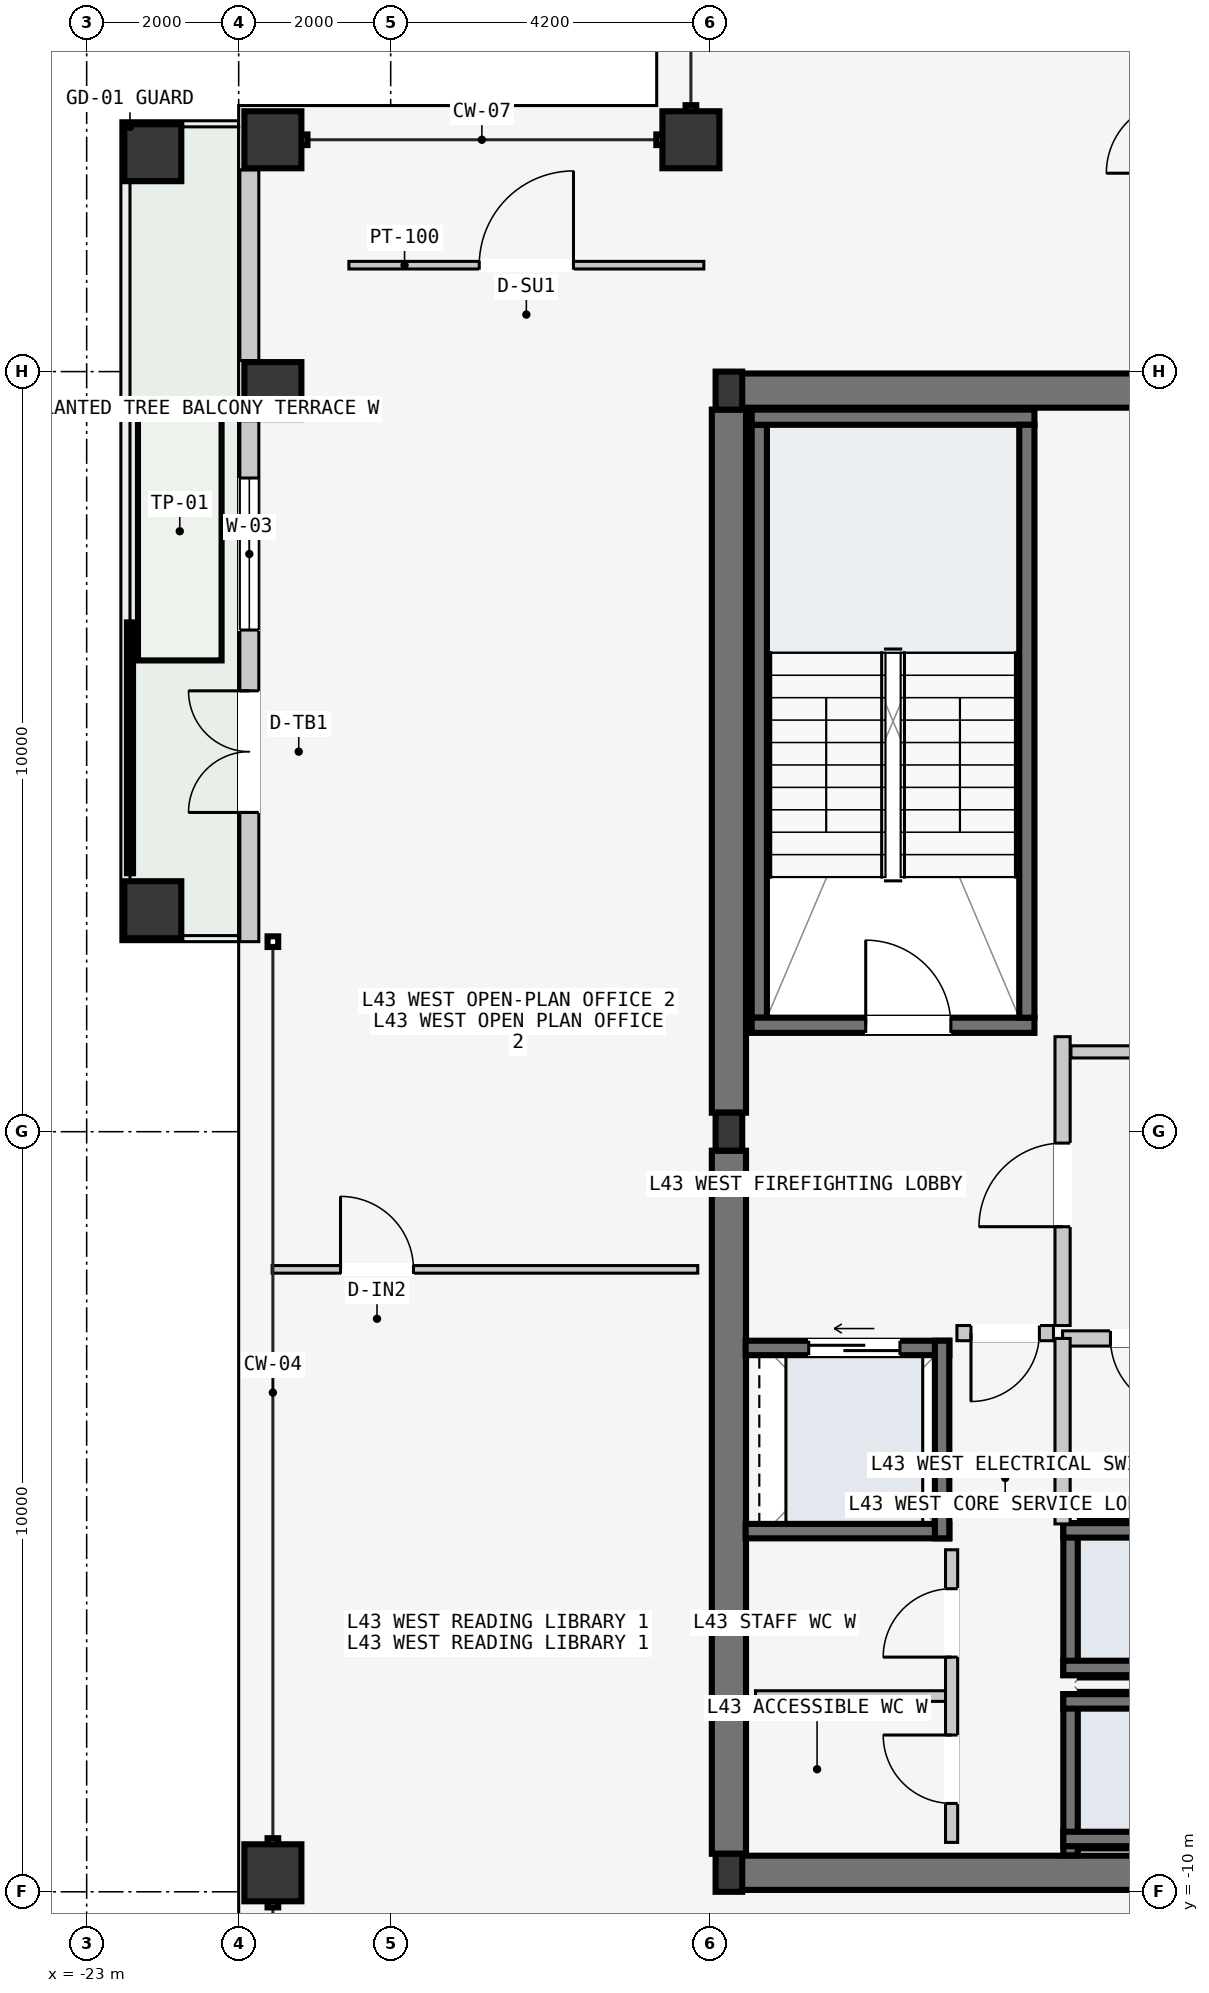
"""IFC4 building model, lengths in metres.
Left out: names, types, materials, properties, quantities, classifications, styles, units other than length and angle.
Written with IfcOpenShell. Run it as: python <this file> out.ifc"""

import sys

from ifc_helpers import new_model, si_unit, direction, frame, frame_2d, origin, origin_2d, place, context, subcontext, project, spatial, rectangle, hollow_rectangle, i_section, extrude, element, fill, save


model = new_model("IFC4")
c1 = context("Model", 3, precision=1e-05, world=origin(), true_north=direction((0.0, 1.0)))
c2 = subcontext(c1, "Body", "Model", "MODEL_VIEW")
j1 = project(units=[si_unit("LENGTHUNIT", "METRE"), si_unit("PLANEANGLEUNIT", "RADIAN")], contexts=[c1])
p1 = place(None, origin())
s1 = spatial("IfcSite", under=j1, at=p1, CompositionType="ELEMENT")
p2 = place(p1, origin())
s2 = spatial("IfcBuilding", under=s1, at=p2, CompositionType="ELEMENT")
p3 = place(p2, frame((0.0, 0.0, 165.9)))
s3 = spatial("IfcBuildingStorey", under=s2, at=p3, CompositionType="ELEMENT", Elevation=165.9)
for number, where, z_axis, x_axis in (
    (1, (-14.53, -9.75, -0.2), (0.0, 0.0, 1.0), (1.0, 0.0, 0.0)),
    (2, (-14.53, 9.75, -0.2), (0.0, 0.0, 1.0), (1.0, 0.0, 0.0)),
):
    element("IfcWall", number, at=place(p3, frame(where, z_axis=z_axis, x_axis=x_axis)), inside=s3, PredefinedType="SHEAR", context=c2, shape_type="SweptSolid", body=[
        extrude(rectangle(XDim=6.46, YDim=0.45, at=frame_2d((3.23, 0.0))), origin(), (0.0, 0.0, 1.0), 3.6),
    ])
for number, where, z_axis, x_axis in (
    (3, (-14.55, -9.5, -0.2), (0.0, 0.0, 1.0), (0.0, 1.0, 0.0)),
    (4, (-14.55, 0.25, -0.2), (0.0, 0.0, 1.0), (0.0, 1.0, 0.0)),
):
    element("IfcWall", number, at=place(p3, frame(where, z_axis=z_axis, x_axis=x_axis)), inside=s3, PredefinedType="SHEAR", context=c2, shape_type="SweptSolid", body=[
        extrude(rectangle(XDim=9.25, YDim=0.45, at=frame_2d((4.625, 0.0))), origin(), (0.0, 0.0, 1.0), 3.6),
    ])
p4 = place(p3, frame((-14.15, 1.5, -0.2), z_axis=(0.0, 0.0, 1.0), x_axis=(0.0, 1.0, 0.0)))
e5 = element("IfcWall", 5, at=p4, inside=s3, PredefinedType="SOLIDWALL", context=c2, shape_type="SweptSolid", body=[
    extrude(rectangle(XDim=7.8, YDim=0.2, at=frame_2d((3.9, 0.0))), origin(), (0.0, 0.0, 1.0), 3.6),
])
p5 = place(p3, frame((-14.25, 1.4, -0.2), z_axis=(0.0, 0.0, 1.0), x_axis=(1.0, 0.0, 0.0)))
e6 = element("IfcWall", 6, at=p5, inside=s3, PredefinedType="SOLIDWALL", context=c2, shape_type="SweptSolid", body=[
    extrude(rectangle(XDim=3.72, YDim=0.2, at=frame_2d((1.86, 0.0))), origin(), (0.0, 0.0, 1.0), 3.6),
])
p6 = place(p5, frame((1.5, 0.0, 0.2)))
e7 = element("IfcOpeningElement", 7, at=p6, cuts=e6, PredefinedType="OPENING", context=c2, shape_type="SweptSolid", body=[
    extrude(rectangle(XDim=1.12, YDim=2.18, at=frame_2d((0.56, 1.09))), frame((0.0, 0.11, 0.0), z_axis=(0.0, -1.0, 0.0), x_axis=(1.0, 0.0, 0.0)), (0.0, 0.0, 1.0), 0.22),
])
p7 = place(p3, frame((-14.25, 9.4, -0.2), z_axis=(0.0, 0.0, 1.0), x_axis=(1.0, 0.0, 0.0)))
e8 = element("IfcWall", 8, at=p7, inside=s3, PredefinedType="SOLIDWALL", context=c2, shape_type="SweptSolid", body=[
    extrude(rectangle(XDim=3.72, YDim=0.2, at=frame_2d((1.86, 0.0))), origin(), (0.0, 0.0, 1.0), 3.6),
])
p8 = place(p3, frame((-10.63, 1.5, -0.2), z_axis=(0.0, 0.0, 1.0), x_axis=(0.0, 1.0, 0.0)))
e9 = element("IfcWall", 9, at=p8, inside=s3, PredefinedType="SOLIDWALL", context=c2, shape_type="SweptSolid", body=[
    extrude(rectangle(XDim=7.8, YDim=0.2, at=frame_2d((3.9, 0.0))), origin(), (0.0, 0.0, 1.0), 3.6),
])
for number, where, z_axis, x_axis in (
    (10, (-14.55, -9.75, 0.0), (0.0, 0.0, 1.0), (1.0, 0.0, 0.0)),
    (11, (-14.55, 0.0, 0.0), (0.0, 0.0, 1.0), (1.0, 0.0, 0.0)),
    (12, (-14.55, 9.75, 0.0), (0.0, 0.0, 1.0), (1.0, 0.0, 0.0)),
):
    element("IfcColumn", number, at=place(p3, frame(where, z_axis=z_axis, x_axis=x_axis)), inside=s3, PredefinedType="COLUMN", context=c2, shape_type="SweptSolid", body=[
        extrude(i_section(OverallWidth=0.35, OverallDepth=0.5, WebThickness=0.02, FlangeThickness=0.032, at=origin_2d()), origin(), (0.0, 0.0, 1.0), 3.6),
    ])
for number, where, z_axis, x_axis in (
    (13, (-20.55, -9.75, 0.0), (0.0, 0.0, 1.0), (0.0, 1.0, 0.0)),
    (14, (-20.55, 9.75, 0.0), (0.0, 0.0, 1.0), (0.0, 1.0, 0.0)),
    (15, (-20.55, 13.05, 0.0), (0.0, 0.0, 1.0), (0.0, 1.0, 0.0)),
    (16, (-15.05, 13.05, 0.0), (0.0, 0.0, 1.0), (1.0, 0.0, 0.0)),
    (17, (-22.13, 2.92, 0.0), (0.0, 0.0, 1.0), (0.0, 1.0, 0.0)),
    (18, (-22.13, 12.88, 0.0), (0.0, 0.0, 1.0), (0.0, 1.0, 0.0)),
):
    element("IfcColumn", number, at=place(p3, frame(where, z_axis=z_axis, x_axis=x_axis)), inside=s3, PredefinedType="COLUMN", context=c2, shape_type="SweptSolid", body=[
        extrude(hollow_rectangle(XDim=0.75, YDim=0.75, WallThickness=0.032, at=origin_2d()), origin(), (0.0, 0.0, 1.0), 3.6),
    ])
p9 = place(p3, frame((-20.86, 2.5, 0.0), z_axis=(0.0, 0.0, 1.0), x_axis=(0.0, 1.0, 0.0)))
e19 = element("IfcWall", 19, at=p9, inside=s3, PredefinedType="STANDARD", context=c2, shape_type="SweptSolid", body=[
    extrude(rectangle(XDim=6.855, YDim=0.25, at=frame_2d((3.427, 0.0))), origin(), (0.0, 0.0, 1.0), 3.4),
])
p10 = place(p9, frame((1.7, 0.0, 0.0)))
e20 = element("IfcOpeningElement", 20, at=p10, cuts=e19, PredefinedType="OPENING", context=c2, shape_type="SweptSolid", body=[
    extrude(rectangle(XDim=1.6, YDim=2.2, at=frame_2d((0.8, 1.1))), frame((0.0, 0.135, 0.0), z_axis=(0.0, -1.0, 0.0), x_axis=(1.0, 0.0, 0.0)), (0.0, 0.0, 1.0), 0.27),
])
p11 = place(p9, frame((4.1, 0.0, 0.85)))
e21 = element("IfcOpeningElement", 21, at=p11, cuts=e19, PredefinedType="OPENING", context=c2, shape_type="SweptSolid", body=[
    extrude(rectangle(XDim=2.0, YDim=2.1, at=frame_2d((1.0, 1.05))), frame((0.0, 0.135, 0.0), z_axis=(0.0, -1.0, 0.0), x_axis=(1.0, 0.0, 0.0)), (0.0, 0.0, 1.0), 0.27),
])
p12 = place(p3, frame((-20.86, 10.145, 0.0), z_axis=(0.0, 0.0, 1.0), x_axis=(0.0, 1.0, 0.0)))
e22 = element("IfcWall", 22, at=p12, inside=s3, PredefinedType="STANDARD", context=c2, shape_type="SweptSolid", body=[
    extrude(rectangle(XDim=2.51, YDim=0.25, at=frame_2d((1.255, 0.0))), origin(), (0.0, 0.0, 1.0), 3.4),
])
p13 = place(p3, frame((-10.055, -9.52, -0.2), z_axis=(0.0, 0.0, 1.0), x_axis=(0.0, 1.0, 0.0)))
e23 = element("IfcWall", 23, at=p13, inside=s3, PredefinedType="SOLIDWALL", context=c2, shape_type="SweptSolid", body=[
    extrude(rectangle(XDim=2.12, YDim=0.19, at=frame_2d((1.06, 0.0))), origin(), (0.0, 0.0, 1.0), 3.6),
])
for number, where, z_axis, x_axis in (
    (24, (-10.15, -7.495, -0.2), (0.0, 0.0, 1.0), (1.0, 0.0, 0.0)),
    (25, (-10.15, -9.305, -0.2), (0.0, 0.0, 1.0), (1.0, 0.0, 0.0)),
):
    element("IfcWall", number, at=place(p3, frame(where, z_axis=z_axis, x_axis=x_axis)), inside=s3, PredefinedType="SOLIDWALL", context=c2, shape_type="SweptSolid", body=[
        extrude(rectangle(XDim=2.2, YDim=0.19, at=frame_2d((1.1, 0.0))), origin(), (0.0, 0.0, 1.0), 3.6),
    ])
p14 = place(p3, frame((-10.055, -7.15, -0.2), z_axis=(0.0, 0.0, 1.0), x_axis=(0.0, 1.0, 0.0)))
e26 = element("IfcWall", 26, at=p14, inside=s3, PredefinedType="SOLIDWALL", context=c2, shape_type="SweptSolid", body=[
    extrude(rectangle(XDim=2.0, YDim=0.19, at=frame_2d((1.0, 0.0))), origin(), (0.0, 0.0, 1.0), 3.6),
])
for number, where, z_axis, x_axis in (
    (27, (-10.15, -5.245, -0.2), (0.0, 0.0, 1.0), (1.0, 0.0, 0.0)),
    (28, (-10.15, -7.055, -0.2), (0.0, 0.0, 1.0), (1.0, 0.0, 0.0)),
):
    element("IfcWall", number, at=place(p3, frame(where, z_axis=z_axis, x_axis=x_axis)), inside=s3, PredefinedType="SOLIDWALL", context=c2, shape_type="SweptSolid", body=[
        extrude(rectangle(XDim=2.2, YDim=0.19, at=frame_2d((1.1, 0.0))), origin(), (0.0, 0.0, 1.0), 3.6),
    ])
p15 = place(p3, frame((-14.33, -2.845, -0.2), z_axis=(0.0, 0.0, 1.0), x_axis=(1.0, 0.0, 0.0)))
e29 = element("IfcWall", 29, at=p15, inside=s3, PredefinedType="SOLIDWALL", context=c2, shape_type="SweptSolid", body=[
    extrude(rectangle(XDim=2.68, YDim=0.19, at=frame_2d((1.34, 0.0))), origin(), (0.0, 0.0, 1.0), 3.6),
])
p16 = place(p15, frame((0.83, 0.0, 0.2)))
e30 = element("IfcOpeningElement", 30, at=p16, cuts=e29, PredefinedType="OPENING", context=c2, shape_type="SweptSolid", body=[
    extrude(rectangle(XDim=1.2, YDim=2.2, at=frame_2d((0.6, 1.1))), frame((0.0, 0.105, 0.0), z_axis=(0.0, -1.0, 0.0), x_axis=(1.0, 0.0, 0.0)), (0.0, 0.0, 1.0), 0.21),
])
p17 = place(p3, frame((-14.33, -5.255, -0.2), z_axis=(0.0, 0.0, 1.0), x_axis=(1.0, 0.0, 0.0)))
e31 = element("IfcWall", 31, at=p17, inside=s3, PredefinedType="SOLIDWALL", context=c2, shape_type="SweptSolid", body=[
    extrude(rectangle(XDim=2.68, YDim=0.19, at=frame_2d((1.34, 0.0))), origin(), (0.0, 0.0, 1.0), 3.6),
])
p18 = place(p3, frame((-11.745, -5.35, -0.2), z_axis=(0.0, 0.0, 1.0), x_axis=(0.0, 1.0, 0.0)))
e32 = element("IfcWall", 32, at=p18, inside=s3, PredefinedType="SOLIDWALL", context=c2, shape_type="SweptSolid", body=[
    extrude(rectangle(XDim=2.6, YDim=0.19, at=frame_2d((1.3, 0.0))), origin(), (0.0, 0.0, 1.0), 3.6),
])
p19 = place(p3, frame((-10.16, -2.55, 0.0), z_axis=(0.0, 0.0, 1.0), x_axis=(0.0, 1.0, 0.0)))
e33 = element("IfcWall", 33, at=p19, inside=s3, PredefinedType="PARTITIONING", context=c2, shape_type="SweptSolid", body=[
    extrude(rectangle(XDim=3.8, YDim=0.2, at=frame_2d((1.9, 0.0))), origin(), (0.0, 0.0, 1.0), 3.4),
])
p20 = place(p19, frame((1.3, 0.0, 0.0)))
e34 = element("IfcOpeningElement", 34, at=p20, cuts=e33, PredefinedType="OPENING", context=c2, shape_type="SweptSolid", body=[
    extrude(rectangle(XDim=1.1, YDim=2.15, at=frame_2d((0.55, 1.075))), frame((0.0, 0.11, 0.0), z_axis=(0.0, -1.0, 0.0), x_axis=(1.0, 0.0, 0.0)), (0.0, 0.0, 1.0), 0.22),
])
p21 = place(p3, frame((-10.28, -2.65, 0.0), z_axis=(0.0, 0.0, 1.0), x_axis=(-1.0, 0.0, 0.0)))
e35 = element("IfcWall", 35, at=p21, inside=s3, PredefinedType="PARTITIONING", context=c2, shape_type="SweptSolid", body=[
    extrude(rectangle(XDim=1.27, YDim=0.2, at=frame_2d((0.635, 0.0))), origin(), (0.0, 0.0, 1.0), 3.4),
])
p22 = place(p21, frame((0.185, 0.0, 0.0)))
e36 = element("IfcOpeningElement", 36, at=p22, cuts=e35, PredefinedType="OPENING", context=c2, shape_type="SweptSolid", body=[
    extrude(rectangle(XDim=0.9, YDim=2.15, at=frame_2d((0.45, 1.075))), frame((0.0, 0.11, 0.0), z_axis=(0.0, -1.0, 0.0), x_axis=(1.0, 0.0, 0.0)), (0.0, 0.0, 1.0), 0.22),
])
p23 = place(p3, frame((-7.96, -2.72, 0.0), z_axis=(0.0, 0.0, 1.0), x_axis=(-1.0, 0.0, 0.0)))
e37 = element("IfcWall", 37, at=p23, inside=s3, PredefinedType="PARTITIONING", context=c2, shape_type="SweptSolid", body=[
    extrude(rectangle(XDim=2.2, YDim=0.2, at=frame_2d((1.1, 0.0))), origin(), (0.0, 0.0, 1.0), 3.4),
])
p24 = place(p23, frame((0.62, 0.0, 0.0)))
e38 = element("IfcOpeningElement", 38, at=p24, cuts=e37, PredefinedType="OPENING", context=c2, shape_type="SweptSolid", body=[
    extrude(rectangle(XDim=0.95, YDim=2.1, at=frame_2d((0.475, 1.05))), frame((0.0, 0.11, 0.0), z_axis=(0.0, -1.0, 0.0), x_axis=(1.0, 0.0, 0.0)), (0.0, 0.0, 1.0), 0.22),
])
p25 = place(p3, frame((-10.16, -5.16, 0.0), z_axis=(0.0, 0.0, 1.0), x_axis=(0.0, 1.0, 0.0)))
e39 = element("IfcWall", 39, at=p25, inside=s3, PredefinedType="PARTITIONING", context=c2, shape_type="SweptSolid", body=[
    extrude(rectangle(XDim=2.44, YDim=0.2, at=frame_2d((1.22, 0.0))), origin(), (0.0, 0.0, 1.0), 3.4),
])
p26 = place(p3, frame((-11.7, -7.425, 0.0), z_axis=(0.0, 0.0, 1.0), x_axis=(-1.0, 0.0, 0.0)))
e40 = element("IfcWall", 40, at=p26, inside=s3, PredefinedType="PARTITIONING", context=c2, shape_type="SweptSolid", body=[
    extrude(rectangle(XDim=2.5, YDim=0.14, at=frame_2d((1.25, 0.0))), origin(), (0.0, 0.0, 1.0), 3.4),
])
p27 = place(p3, frame((-11.62, -9.35, 0.0), z_axis=(0.0, 0.0, 1.0), x_axis=(0.0, 1.0, 0.0)))
e41 = element("IfcWall", 41, at=p27, inside=s3, PredefinedType="PARTITIONING", context=c2, shape_type="SweptSolid", body=[
    extrude(rectangle(XDim=3.85, YDim=0.16, at=frame_2d((1.925, 0.0))), origin(), (0.0, 0.0, 1.0), 3.4),
])
p28 = place(p27, frame((0.512, 0.0, 0.0)))
e42 = element("IfcOpeningElement", 42, at=p28, cuts=e41, PredefinedType="OPENING", context=c2, shape_type="SweptSolid", body=[
    extrude(rectangle(XDim=0.9, YDim=2.15, at=frame_2d((0.45, 1.075))), frame((0.0, 0.09, 0.0), z_axis=(0.0, -1.0, 0.0), x_axis=(1.0, 0.0, 0.0)), (0.0, 0.0, 1.0), 0.18),
])
p29 = place(p27, frame((2.438, 0.0, 0.0)))
e43 = element("IfcOpeningElement", 43, at=p29, cuts=e41, PredefinedType="OPENING", context=c2, shape_type="SweptSolid", body=[
    extrude(rectangle(XDim=0.9, YDim=2.15, at=frame_2d((0.45, 1.075))), frame((0.0, 0.09, 0.0), z_axis=(0.0, -1.0, 0.0), x_axis=(1.0, 0.0, 0.0)), (0.0, 0.0, 1.0), 0.18),
])
p30 = place(p3, frame((-10.05, 1.05, 0.0), z_axis=(0.0, 0.0, 1.0), x_axis=(1.0, 0.0, 0.0)))
e44 = element("IfcWall", 44, at=p30, inside=s3, PredefinedType="PARTITIONING", context=c2, shape_type="SweptSolid", body=[
    extrude(rectangle(XDim=8.79, YDim=0.16, at=frame_2d((4.395, 0.0))), origin(), (0.0, 0.0, 1.0), 3.4),
])
p31 = place(p3, frame((-19.55, 11.4, 0.0), z_axis=(0.0, 0.0, 1.0), x_axis=(1.0, 0.0, 0.0)))
e45 = element("IfcWall", 45, at=p31, inside=s3, PredefinedType="PARTITIONING", context=c2, shape_type="SweptSolid", body=[
    extrude(rectangle(XDim=4.67, YDim=0.1, at=frame_2d((2.335, 0.0))), origin(), (0.0, 0.0, 1.0), 3.4),
])
p32 = place(p31, frame((1.715, 0.0, 0.0)))
e46 = element("IfcOpeningElement", 46, at=p32, cuts=e45, PredefinedType="OPENING", context=c2, shape_type="SweptSolid", body=[
    extrude(rectangle(XDim=1.24, YDim=2.24, at=frame_2d((0.62, 1.12))), frame((0.0, 0.06, 0.0), z_axis=(0.0, -1.0, 0.0), x_axis=(1.0, 0.0, 0.0)), (0.0, 0.0, 1.0), 0.12),
])
p33 = place(p3, frame((-20.56, -1.811, 0.0), z_axis=(0.0, 0.0, 1.0), x_axis=(1.0, 0.0, 0.0)))
e47 = element("IfcWall", 47, at=p33, inside=s3, PredefinedType="PARTITIONING", context=c2, shape_type="SweptSolid", body=[
    extrude(rectangle(XDim=5.6, YDim=0.1, at=frame_2d((2.8, 0.0))), origin(), (0.0, 0.0, 1.0), 3.4),
])
p34 = place(p33, frame((0.9, 0.0, 0.0)))
e48 = element("IfcOpeningElement", 48, at=p34, cuts=e47, PredefinedType="OPENING", context=c2, shape_type="SweptSolid", body=[
    extrude(rectangle(XDim=0.96, YDim=2.18, at=frame_2d((0.48, 1.09))), frame((0.0, 0.06, 0.0), z_axis=(0.0, -1.0, 0.0), x_axis=(1.0, 0.0, 0.0)), (0.0, 0.0, 1.0), 0.12),
])
p35 = place(p6, origin())
e49 = element("IfcDoor", 49, at=p35, inside=s3, OperationType="SINGLE_SWING_LEFT", PredefinedType="DOOR", context=c2, shape_type="SweptSolid", body=[
    extrude(rectangle(XDim=1.12, YDim=2.18, at=frame_2d((0.56, 1.09))), frame((0.0, 0.025, 0.0), z_axis=(0.0, -1.0, 0.0), x_axis=(1.0, 0.0, 0.0)), (0.0, 0.0, 1.0), 0.05),
])
fill(e7, e49)
p36 = place(p10, origin())
e50 = element("IfcDoor", 50, at=p36, inside=s3, OperationType="DOUBLE_DOOR_SINGLE_SWING", PredefinedType="DOOR", context=c2, shape_type="SweptSolid", body=[
    extrude(rectangle(XDim=1.6, YDim=2.2, at=frame_2d((0.8, 1.1))), frame((0.0, 0.025, 0.0), z_axis=(0.0, -1.0, 0.0), x_axis=(1.0, 0.0, 0.0)), (0.0, 0.0, 1.0), 0.05),
])
fill(e20, e50)
p37 = place(p11, origin())
e51 = element("IfcWindow", 51, at=p37, inside=s3, PartitioningType="SINGLE_PANEL", PredefinedType="WINDOW", context=c2, shape_type="SweptSolid", body=[
    extrude(rectangle(XDim=2.0, YDim=2.1, at=frame_2d((1.0, 1.05))), frame((0.0, 0.03, 0.0), z_axis=(0.0, -1.0, 0.0), x_axis=(1.0, 0.0, 0.0)), (0.0, 0.0, 1.0), 0.06),
])
fill(e21, e51)
p38 = place(p16, origin())
e52 = element("IfcDoor", 52, at=p38, inside=s3, OperationType="SLIDING_TO_LEFT", PredefinedType="DOOR", context=c2, shape_type="SweptSolid", body=[
    extrude(rectangle(XDim=1.2, YDim=2.2, at=frame_2d((0.6, 1.1))), frame((0.0, 0.025, 0.0), z_axis=(0.0, -1.0, 0.0), x_axis=(1.0, 0.0, 0.0)), (0.0, 0.0, 1.0), 0.05),
])
fill(e30, e52)
p39 = place(p20, origin())
e53 = element("IfcDoor", 53, at=p39, inside=s3, OperationType="SINGLE_SWING_LEFT", PredefinedType="DOOR", context=c2, shape_type="SweptSolid", body=[
    extrude(rectangle(XDim=1.1, YDim=2.15, at=frame_2d((0.55, 1.075))), frame((0.0, 0.025, 0.0), z_axis=(0.0, -1.0, 0.0), x_axis=(1.0, 0.0, 0.0)), (0.0, 0.0, 1.0), 0.05),
])
fill(e34, e53)
p40 = place(p22, origin())
e54 = element("IfcDoor", 54, at=p40, inside=s3, OperationType="SINGLE_SWING_RIGHT", PredefinedType="DOOR", context=c2, shape_type="SweptSolid", body=[
    extrude(rectangle(XDim=0.9, YDim=2.15, at=frame_2d((0.45, 1.075))), frame((0.0, 0.025, 0.0), z_axis=(0.0, -1.0, 0.0), x_axis=(1.0, 0.0, 0.0)), (0.0, 0.0, 1.0), 0.05),
])
fill(e36, e54)
p41 = place(p24, origin())
e55 = element("IfcDoor", 55, at=p41, inside=s3, OperationType="SINGLE_SWING_LEFT", PredefinedType="DOOR", context=c2, shape_type="SweptSolid", body=[
    extrude(rectangle(XDim=0.95, YDim=2.1, at=frame_2d((0.475, 1.05))), frame((0.0, 0.025, 0.0), z_axis=(0.0, -1.0, 0.0), x_axis=(1.0, 0.0, 0.0)), (0.0, 0.0, 1.0), 0.05),
])
fill(e38, e55)
p42 = place(p28, origin())
e56 = element("IfcDoor", 56, at=p42, inside=s3, OperationType="SINGLE_SWING_RIGHT", PredefinedType="DOOR", context=c2, shape_type="SweptSolid", body=[
    extrude(rectangle(XDim=0.9, YDim=2.15, at=frame_2d((0.45, 1.075))), frame((0.0, 0.025, 0.0), z_axis=(0.0, -1.0, 0.0), x_axis=(1.0, 0.0, 0.0)), (0.0, 0.0, 1.0), 0.05),
])
fill(e42, e56)
p43 = place(p29, origin())
e57 = element("IfcDoor", 57, at=p43, inside=s3, OperationType="SINGLE_SWING_LEFT", PredefinedType="DOOR", context=c2, shape_type="SweptSolid", body=[
    extrude(rectangle(XDim=0.9, YDim=2.15, at=frame_2d((0.45, 1.075))), frame((0.0, 0.025, 0.0), z_axis=(0.0, -1.0, 0.0), x_axis=(1.0, 0.0, 0.0)), (0.0, 0.0, 1.0), 0.05),
])
fill(e43, e57)
p44 = place(p32, origin())
e58 = element("IfcDoor", 58, at=p44, inside=s3, OperationType="SINGLE_SWING_RIGHT", PredefinedType="DOOR", context=c2, shape_type="SweptSolid", body=[
    extrude(rectangle(XDim=1.24, YDim=2.24, at=frame_2d((0.62, 1.12))), frame((0.0, 0.025, 0.0), z_axis=(0.0, -1.0, 0.0), x_axis=(1.0, 0.0, 0.0)), (0.0, 0.0, 1.0), 0.05),
])
fill(e46, e58)
p45 = place(p34, origin())
e59 = element("IfcDoor", 59, at=p45, inside=s3, OperationType="SINGLE_SWING_LEFT", PredefinedType="DOOR", context=c2, shape_type="SweptSolid", body=[
    extrude(rectangle(XDim=0.96, YDim=2.18, at=frame_2d((0.48, 1.09))), frame((0.0, 0.025, 0.0), z_axis=(0.0, -1.0, 0.0), x_axis=(1.0, 0.0, 0.0)), (0.0, 0.0, 1.0), 0.05),
])
fill(e48, e59)
save(model, sys.argv[1])
